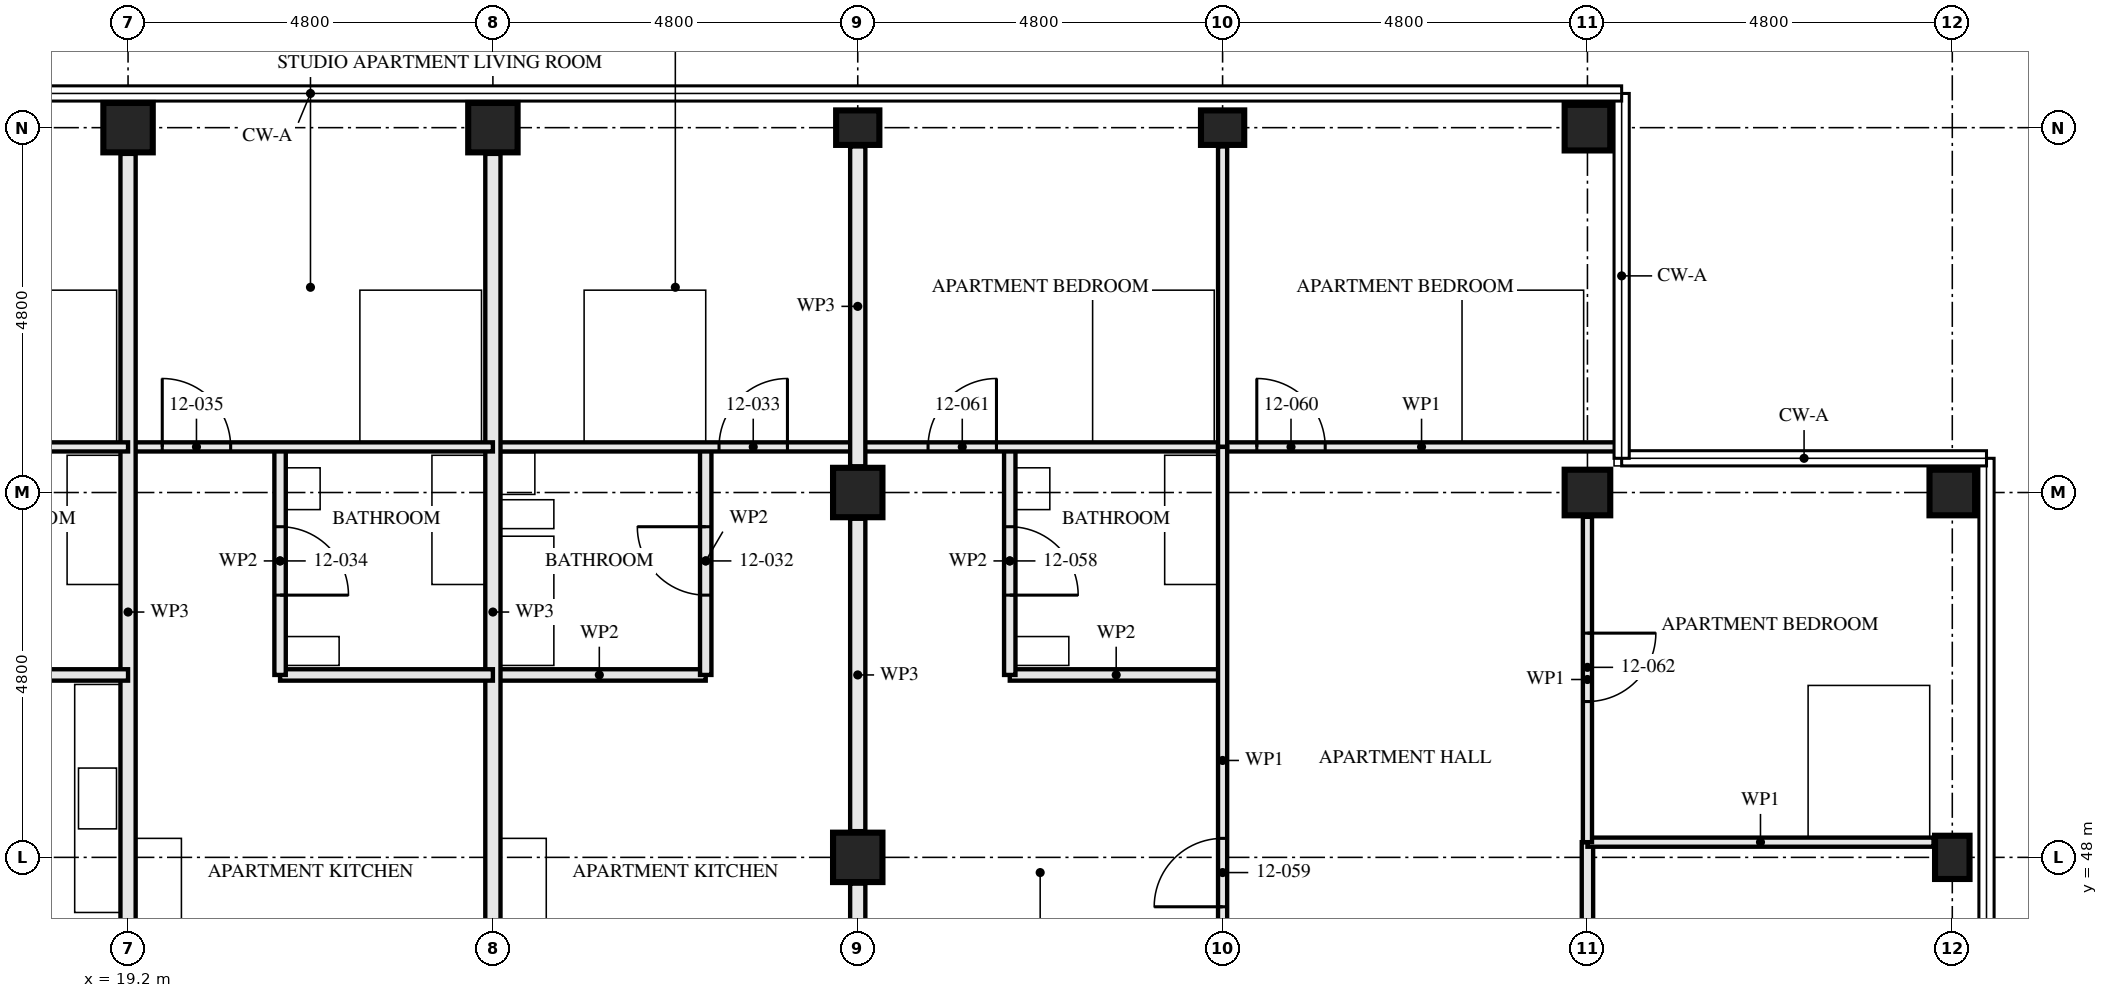
"""IFC4 building model, lengths in metres.
Left out: names, types, materials, properties, quantities, classifications, styles, units other than length and angle.
Written with IfcOpenShell. Run it as: python <this file> out.ifc"""

import sys

from ifc_helpers import new_model, si_unit, direction, frame, frame_2d, origin, origin_2d, place, context, subcontext, project, spatial, rectangle, hollow_rectangle, i_section, extrude, element, fill, save


model = new_model("IFC4")
c1 = context("Model", 3, precision=1e-05, world=origin(), true_north=direction((0.0, 1.0)))
c2 = subcontext(c1, "Body", "Model", "MODEL_VIEW")
j1 = project(units=[si_unit("LENGTHUNIT", "METRE"), si_unit("PLANEANGLEUNIT", "RADIAN")], contexts=[c1])
p1 = place(None, origin())
s1 = spatial("IfcSite", under=j1, at=p1, CompositionType="ELEMENT")
p2 = place(p1, origin())
s2 = spatial("IfcBuilding", under=s1, at=p2, CompositionType="ELEMENT")
p3 = place(p2, frame((0.0, 0.0, 48.0)))
s3 = spatial("IfcBuildingStorey", under=s2, at=p3, CompositionType="ELEMENT", Elevation=48.0)
for number, where, z_axis, x_axis in (
    (1, (19.2, 57.6, 0.0), (0.0, 0.0, 1.0), (0.0, 1.0, 0.0)),
    (2, (24.0, 57.6, 0.0), (0.0, 0.0, 1.0), (0.0, 1.0, 0.0)),
):
    element("IfcColumn", number, at=place(p3, frame(where, z_axis=z_axis, x_axis=x_axis)), inside=s3, PredefinedType="COLUMN", context=c2, shape_type="SweptSolid", body=[
        extrude(hollow_rectangle(XDim=0.65, YDim=0.65, WallThickness=0.08, at=origin_2d()), origin(), (0.0, 0.0, 1.0), 3.5),
    ])
for number, where, z_axis, x_axis in (
    (3, (28.8, 48.0, 0.0), (0.0, 0.0, 1.0), (1.0, 0.0, 0.0)),
    (4, (28.8, 52.8, 0.0), (0.0, 0.0, 1.0), (1.0, 0.0, 0.0)),
):
    element("IfcColumn", number, at=place(p3, frame(where, z_axis=z_axis, x_axis=x_axis)), inside=s3, PredefinedType="COLUMN", context=c2, shape_type="SweptSolid", body=[
        extrude(hollow_rectangle(XDim=0.65, YDim=0.65, WallThickness=0.05, at=origin_2d()), origin(), (0.0, 0.0, 1.0), 3.5),
    ])
for number, where, z_axis, x_axis in (
    (5, (28.8, 57.6, 0.0), (0.0, 0.0, 1.0), (0.0, 1.0, 0.0)),
    (6, (33.6, 57.6, 0.0), (0.0, 0.0, 1.0), (0.0, 1.0, 0.0)),
):
    element("IfcColumn", number, at=place(p3, frame(where, z_axis=z_axis, x_axis=x_axis)), inside=s3, PredefinedType="COLUMN", context=c2, shape_type="SweptSolid", body=[
        extrude(i_section(OverallWidth=0.454, OverallDepth=0.569, WebThickness=0.078, FlangeThickness=0.125, FilletRadius=0.015, at=origin_2d()), origin(), (0.0, 0.0, 1.0), 3.5),
    ])
for number, where, z_axis, x_axis in (
    (7, (38.4, 52.8, 0.0), (0.0, 0.0, 1.0), (0.0, 1.0, 0.0)),
    (8, (38.4, 57.6, 0.0), (0.0, 0.0, 1.0), (0.0, 1.0, 0.0)),
):
    element("IfcColumn", number, at=place(p3, frame(where, z_axis=z_axis, x_axis=x_axis)), inside=s3, PredefinedType="COLUMN", context=c2, shape_type="SweptSolid", body=[
        extrude(hollow_rectangle(XDim=0.6, YDim=0.6, WallThickness=0.05, at=origin_2d()), origin(), (0.0, 0.0, 1.0), 3.5),
    ])
p4 = place(p3, frame((43.2, 48.0, 0.0), z_axis=(0.0, 0.0, 1.0), x_axis=(1.0, 0.0, 0.0)))
e9 = element("IfcColumn", 9, at=p4, inside=s3, PredefinedType="COLUMN", context=c2, shape_type="SweptSolid", body=[
    extrude(i_section(OverallWidth=0.454, OverallDepth=0.569, WebThickness=0.078, FlangeThickness=0.125, FilletRadius=0.015, at=origin_2d()), origin(), (0.0, 0.0, 1.0), 3.5),
])
p5 = place(p3, frame((43.2, 52.8, 0.0), z_axis=(0.0, 0.0, 1.0), x_axis=(0.0, 1.0, 0.0)))
e10 = element("IfcColumn", 10, at=p5, inside=s3, PredefinedType="COLUMN", context=c2, shape_type="SweptSolid", body=[
    extrude(hollow_rectangle(XDim=0.6, YDim=0.6, WallThickness=0.05, at=origin_2d()), origin(), (0.0, 0.0, 1.0), 3.5),
])
p6 = place(p3, frame((26.8, 53.4, 0.0), z_axis=(0.0, 0.0, 1.0), x_axis=(0.0, -1.0, 0.0)))
e11 = element("IfcWall", 11, at=p6, inside=s3, PredefinedType="PARTITIONING", context=c2, shape_type="SweptSolid", body=[
    extrude(rectangle(XDim=3.0, YDim=0.15, at=frame_2d((1.5, 0.0))), origin(), (0.0, 0.0, 1.0), 2.55),
])
p7 = place(p6, frame((1.05, 0.0, 0.0)))
e12 = element("IfcOpeningElement", 12, at=p7, cuts=e11, PredefinedType="OPENING", context=c2, shape_type="SweptSolid", body=[
    extrude(rectangle(XDim=0.9, YDim=2.1, at=frame_2d((0.45, 1.05))), frame((0.0, 0.085, 0.0), z_axis=(0.0, -1.0, 0.0), x_axis=(1.0, 0.0, 0.0)), (0.0, 0.0, 1.0), 0.171),
])
p8 = place(p3, frame((26.8, 50.4, 0.0), z_axis=(0.0, 0.0, 1.0), x_axis=(-1.0, 0.0, 0.0)))
e13 = element("IfcWall", 13, at=p8, inside=s3, PredefinedType="PARTITIONING", context=c2, shape_type="SweptSolid", body=[
    extrude(rectangle(XDim=2.8, YDim=0.15, at=frame_2d((1.4, 0.0))), origin(), (0.0, 0.0, 1.0), 3.33),
])
p9 = place(p3, frame((28.8, 53.4, 0.0), z_axis=(0.0, 0.0, 1.0), x_axis=(-1.0, 0.0, 0.0)))
e14 = element("IfcWall", 14, at=p9, inside=s3, PredefinedType="PARTITIONING", context=c2, shape_type="SweptSolid", body=[
    extrude(rectangle(XDim=4.8, YDim=0.12, at=frame_2d((2.4, 0.0))), origin(), (0.0, 0.0, 1.0), 3.33),
])
p10 = place(p9, frame((0.925, 0.0, 0.0)))
e15 = element("IfcOpeningElement", 15, at=p10, cuts=e14, PredefinedType="OPENING", context=c2, shape_type="SweptSolid", body=[
    extrude(rectangle(XDim=0.9, YDim=2.1, at=frame_2d((0.45, 1.05))), frame((0.0, 0.071, 0.0), z_axis=(0.0, -1.0, 0.0), x_axis=(1.0, 0.0, 0.0)), (0.0, 0.0, 1.0), 0.141),
])
p11 = place(p3, frame((24.0, 57.255, 0.0), z_axis=(0.0, 0.0, 1.0), x_axis=(0.0, -1.0, 0.0)))
e16 = element("IfcWall", 16, at=p11, inside=s3, PredefinedType="PARTITIONING", context=c2, shape_type="SweptSolid", body=[
    extrude(rectangle(XDim=12.055, YDim=0.2, at=frame_2d((6.027, 0.0))), origin(), (0.0, 0.0, 1.0), 2.55),
])
p12 = place(p3, frame((21.2, 53.4, 0.0), z_axis=(0.0, 0.0, 1.0), x_axis=(0.0, -1.0, 0.0)))
e17 = element("IfcWall", 17, at=p12, inside=s3, PredefinedType="PARTITIONING", context=c2, shape_type="SweptSolid", body=[
    extrude(rectangle(XDim=3.0, YDim=0.15, at=frame_2d((1.5, 0.0))), origin(), (0.0, 0.0, 1.0), 2.55),
])
p13 = place(p12, frame((1.05, 0.0, 0.0)))
e18 = element("IfcOpeningElement", 18, at=p13, cuts=e17, PredefinedType="OPENING", context=c2, shape_type="SweptSolid", body=[
    extrude(rectangle(XDim=0.9, YDim=2.1, at=frame_2d((0.45, 1.05))), frame((0.0, 0.085, 0.0), z_axis=(0.0, -1.0, 0.0), x_axis=(1.0, 0.0, 0.0)), (0.0, 0.0, 1.0), 0.171),
])
p14 = place(p3, frame((24.0, 50.4, 0.0), z_axis=(0.0, 0.0, 1.0), x_axis=(-1.0, 0.0, 0.0)))
e19 = element("IfcWall", 19, at=p14, inside=s3, PredefinedType="PARTITIONING", context=c2, shape_type="SweptSolid", body=[
    extrude(rectangle(XDim=2.8, YDim=0.15, at=frame_2d((1.4, 0.0))), origin(), (0.0, 0.0, 1.0), 3.33),
])
p15 = place(p3, frame((24.0, 53.4, 0.0), z_axis=(0.0, 0.0, 1.0), x_axis=(-1.0, 0.0, 0.0)))
e20 = element("IfcWall", 20, at=p15, inside=s3, PredefinedType="PARTITIONING", context=c2, shape_type="SweptSolid", body=[
    extrude(rectangle(XDim=4.8, YDim=0.12, at=frame_2d((2.4, 0.0))), origin(), (0.0, 0.0, 1.0), 3.33),
])
p16 = place(p15, frame((3.45, 0.0, 0.0)))
e21 = element("IfcOpeningElement", 21, at=p16, cuts=e20, PredefinedType="OPENING", context=c2, shape_type="SweptSolid", body=[
    extrude(rectangle(XDim=0.9, YDim=2.1, at=frame_2d((0.45, 1.05))), frame((0.0, 0.071, 0.0), z_axis=(0.0, -1.0, 0.0), x_axis=(1.0, 0.0, 0.0)), (0.0, 0.0, 1.0), 0.141),
])
p17 = place(p3, frame((19.2, 57.255, 0.0), z_axis=(0.0, 0.0, 1.0), x_axis=(0.0, -1.0, 0.0)))
e22 = element("IfcWall", 22, at=p17, inside=s3, PredefinedType="PARTITIONING", context=c2, shape_type="SweptSolid", body=[
    extrude(rectangle(XDim=12.055, YDim=0.2, at=frame_2d((6.027, 0.0))), origin(), (0.0, 0.0, 1.0), 2.55),
])
p18 = place(p3, frame((19.2, 50.4, 0.0), z_axis=(0.0, 0.0, 1.0), x_axis=(-1.0, 0.0, 0.0)))
e23 = element("IfcWall", 23, at=p18, inside=s3, PredefinedType="PARTITIONING", context=c2, shape_type="SweptSolid", body=[
    extrude(rectangle(XDim=2.8, YDim=0.15, at=frame_2d((1.4, 0.0))), origin(), (0.0, 0.0, 1.0), 3.33),
])
p19 = place(p3, frame((19.2, 53.4, 0.0), z_axis=(0.0, 0.0, 1.0), x_axis=(-1.0, 0.0, 0.0)))
e24 = element("IfcWall", 24, at=p19, inside=s3, PredefinedType="PARTITIONING", context=c2, shape_type="SweptSolid", body=[
    extrude(rectangle(XDim=4.8, YDim=0.12, at=frame_2d((2.4, 0.0))), origin(), (0.0, 0.0, 1.0), 3.33),
])
p20 = place(p19, frame((2.975, 0.0, 0.0)))
e25 = element("IfcOpeningElement", 25, at=p20, cuts=e24, PredefinedType="OPENING", context=c2, shape_type="SweptSolid", body=[
    extrude(rectangle(XDim=0.9, YDim=2.1, at=frame_2d((0.45, 1.05))), frame((0.0, 0.071, 0.0), z_axis=(0.0, -1.0, 0.0), x_axis=(1.0, 0.0, 0.0)), (0.0, 0.0, 1.0), 0.141),
])
p21 = place(p3, frame((38.4, 48.2, 0.0), z_axis=(0.0, 0.0, 1.0), x_axis=(0.0, -1.0, 0.0)))
e26 = element("IfcWall", 26, at=p21, inside=s3, PredefinedType="PARTITIONING", context=c2, shape_type="SweptSolid", body=[
    extrude(rectangle(XDim=3.0, YDim=0.15, at=frame_2d((1.5, 0.0))), origin(), (0.0, 0.0, 1.0), 2.55),
])
p22 = place(p21, frame((1.05, 0.0, 0.0)))
e27 = element("IfcOpeningElement", 27, at=p22, cuts=e26, PredefinedType="OPENING", context=c2, shape_type="SweptSolid", body=[
    extrude(rectangle(XDim=0.9, YDim=2.1, at=frame_2d((0.45, 1.05))), frame((0.0, 0.085, 0.0), z_axis=(0.0, -1.0, 0.0), x_axis=(1.0, 0.0, 0.0)), (0.0, 0.0, 1.0), 0.171),
])
p23 = place(p3, frame((30.8, 53.4, 0.0), z_axis=(0.0, 0.0, 1.0), x_axis=(0.0, -1.0, 0.0)))
e28 = element("IfcWall", 28, at=p23, inside=s3, PredefinedType="PARTITIONING", context=c2, shape_type="SweptSolid", body=[
    extrude(rectangle(XDim=3.0, YDim=0.15, at=frame_2d((1.5, 0.0))), origin(), (0.0, 0.0, 1.0), 2.55),
])
p24 = place(p23, frame((1.05, 0.0, 0.0)))
e29 = element("IfcOpeningElement", 29, at=p24, cuts=e28, PredefinedType="OPENING", context=c2, shape_type="SweptSolid", body=[
    extrude(rectangle(XDim=0.9, YDim=2.1, at=frame_2d((0.45, 1.05))), frame((0.0, 0.085, 0.0), z_axis=(0.0, -1.0, 0.0), x_axis=(1.0, 0.0, 0.0)), (0.0, 0.0, 1.0), 0.171),
])
p25 = place(p3, frame((33.6, 50.4, 0.0), z_axis=(0.0, 0.0, 1.0), x_axis=(-1.0, 0.0, 0.0)))
e30 = element("IfcWall", 30, at=p25, inside=s3, PredefinedType="PARTITIONING", context=c2, shape_type="SweptSolid", body=[
    extrude(rectangle(XDim=2.8, YDim=0.15, at=frame_2d((1.4, 0.0))), origin(), (0.0, 0.0, 1.0), 3.33),
])
p26 = place(p3, frame((33.6, 53.4, 0.0), z_axis=(0.0, 0.0, 1.0), x_axis=(0.0, -1.0, 0.0)))
e31 = element("IfcWall", 31, at=p26, inside=s3, PredefinedType="PARTITIONING", context=c2, shape_type="SweptSolid", body=[
    extrude(rectangle(XDim=8.25, YDim=0.12, at=frame_2d((4.125, 0.0))), origin(), (0.0, 0.0, 1.0), 2.55),
])
p27 = place(p26, frame((5.15, 0.0, 0.0)))
e32 = element("IfcOpeningElement", 32, at=p27, cuts=e31, PredefinedType="OPENING", context=c2, shape_type="SweptSolid", body=[
    extrude(rectangle(XDim=0.9, YDim=2.1, at=frame_2d((0.45, 1.05))), frame((0.0, 0.071, 0.0), z_axis=(0.0, -1.0, 0.0), x_axis=(1.0, 0.0, 0.0)), (0.0, 0.0, 1.0), 0.141),
])
p28 = place(p3, frame((42.953, 48.2, 0.0), z_axis=(0.0, 0.0, 1.0), x_axis=(-1.0, 0.0, 0.0)))
e33 = element("IfcWall", 33, at=p28, inside=s3, PredefinedType="PARTITIONING", context=c2, shape_type="SweptSolid", body=[
    extrude(rectangle(XDim=4.553, YDim=0.12, at=frame_2d((2.276, 0.0))), origin(), (0.0, 0.0, 1.0), 3.33),
])
p29 = place(p3, frame((38.835, 53.4, 0.0), z_axis=(0.0, 0.0, 1.0), x_axis=(-1.0, 0.0, 0.0)))
e34 = element("IfcWall", 34, at=p29, inside=s3, PredefinedType="PARTITIONING", context=c2, shape_type="SweptSolid", body=[
    extrude(rectangle(XDim=5.235, YDim=0.12, at=frame_2d((2.617, 0.0))), origin(), (0.0, 0.0, 1.0), 2.32),
])
p30 = place(p29, frame((3.885, 0.0, 0.0)))
e35 = element("IfcOpeningElement", 35, at=p30, cuts=e34, PredefinedType="OPENING", context=c2, shape_type="SweptSolid", body=[
    extrude(rectangle(XDim=0.9, YDim=2.1, at=frame_2d((0.45, 1.05))), frame((0.0, 0.071, 0.0), z_axis=(0.0, -1.0, 0.0), x_axis=(1.0, 0.0, 0.0)), (0.0, 0.0, 1.0), 0.141),
])
p31 = place(p3, frame((33.6, 53.4, 0.0), z_axis=(0.0, 0.0, 1.0), x_axis=(-1.0, 0.0, 0.0)))
e36 = element("IfcWall", 36, at=p31, inside=s3, PredefinedType="PARTITIONING", context=c2, shape_type="SweptSolid", body=[
    extrude(rectangle(XDim=4.8, YDim=0.12, at=frame_2d((2.4, 0.0))), origin(), (0.0, 0.0, 1.0), 3.33),
])
p32 = place(p31, frame((2.975, 0.0, 0.0)))
e37 = element("IfcOpeningElement", 37, at=p32, cuts=e36, PredefinedType="OPENING", context=c2, shape_type="SweptSolid", body=[
    extrude(rectangle(XDim=0.9, YDim=2.1, at=frame_2d((0.45, 1.05))), frame((0.0, 0.071, 0.0), z_axis=(0.0, -1.0, 0.0), x_axis=(1.0, 0.0, 0.0)), (0.0, 0.0, 1.0), 0.141),
])
p33 = place(p3, frame((38.4, 52.48, 0.0), z_axis=(0.0, 0.0, 1.0), x_axis=(0.0, -1.0, 0.0)))
e38 = element("IfcWall", 38, at=p33, inside=s3, PredefinedType="PARTITIONING", context=c2, shape_type="SweptSolid", body=[
    extrude(rectangle(XDim=4.28, YDim=0.12, at=frame_2d((2.14, 0.0))), origin(), (0.0, 0.0, 1.0), 3.33),
])
p34 = place(p33, frame((1.53, 0.0, 0.0)))
e39 = element("IfcOpeningElement", 39, at=p34, cuts=e38, PredefinedType="OPENING", context=c2, shape_type="SweptSolid", body=[
    extrude(rectangle(XDim=0.9, YDim=2.1, at=frame_2d((0.45, 1.05))), frame((0.0, 0.071, 0.0), z_axis=(0.0, -1.0, 0.0), x_axis=(1.0, 0.0, 0.0)), (0.0, 0.0, 1.0), 0.141),
])
p35 = place(p3, frame((33.6, 57.353, 0.0), z_axis=(0.0, 0.0, 1.0), x_axis=(0.0, -1.0, 0.0)))
e40 = element("IfcWall", 40, at=p35, inside=s3, PredefinedType="PARTITIONING", context=c2, shape_type="SweptSolid", body=[
    extrude(rectangle(XDim=3.953, YDim=0.12, at=frame_2d((1.977, 0.0))), origin(), (0.0, 0.0, 1.0), 3.33),
])
p36 = place(p3, frame((28.8, 45.1, 0.0), z_axis=(0.0, 0.0, 1.0), x_axis=(0.0, 1.0, 0.0)))
e41 = element("IfcWall", 41, at=p36, inside=s3, PredefinedType="PARTITIONING", context=c2, shape_type="SweptSolid", body=[
    extrude(rectangle(XDim=2.555, YDim=0.2, at=frame_2d((1.277, 0.0))), origin(), (0.0, 0.0, 1.0), 2.32),
])
p37 = place(p3, frame((28.8, 48.345, 0.0), z_axis=(0.0, 0.0, 1.0), x_axis=(0.0, 1.0, 0.0)))
e42 = element("IfcWall", 42, at=p37, inside=s3, PredefinedType="PARTITIONING", context=c2, shape_type="SweptSolid", body=[
    extrude(rectangle(XDim=4.11, YDim=0.2, at=frame_2d((2.055, 0.0))), origin(), (0.0, 0.0, 1.0), 2.32),
])
p38 = place(p3, frame((28.8, 53.145, 0.0), z_axis=(0.0, 0.0, 1.0), x_axis=(0.0, 1.0, 0.0)))
e43 = element("IfcWall", 43, at=p38, inside=s3, PredefinedType="PARTITIONING", context=c2, shape_type="SweptSolid", body=[
    extrude(rectangle(XDim=4.208, YDim=0.2, at=frame_2d((2.104, 0.0))), origin(), (0.0, 0.0, 1.0), 2.32),
])
p39 = place(p7, frame((0.9, 0.0, 0.0), z_axis=(0.0, 0.0, 1.0), x_axis=(-1.0, 0.0, 0.0)))
e44 = element("IfcDoor", 44, at=p39, inside=s3, OperationType="SINGLE_SWING_LEFT", PredefinedType="DOOR", context=c2, shape_type="SweptSolid", body=[
    extrude(rectangle(XDim=0.9, YDim=2.1, at=frame_2d((0.45, 1.05))), frame((0.0, 0.022, 0.0), z_axis=(0.0, -1.0, 0.0), x_axis=(1.0, 0.0, 0.0)), (0.0, 0.0, 1.0), 0.044),
])
fill(e12, e44)
p40 = place(p10, frame((0.9, 0.0, 0.0), z_axis=(0.0, 0.0, 1.0), x_axis=(-1.0, 0.0, 0.0)))
e45 = element("IfcDoor", 45, at=p40, inside=s3, OperationType="SINGLE_SWING_LEFT", PredefinedType="DOOR", context=c2, shape_type="SweptSolid", body=[
    extrude(rectangle(XDim=0.9, YDim=2.1, at=frame_2d((0.45, 1.05))), frame((0.0, 0.022, 0.0), z_axis=(0.0, -1.0, 0.0), x_axis=(1.0, 0.0, 0.0)), (0.0, 0.0, 1.0), 0.044),
])
fill(e15, e45)
p41 = place(p13, origin())
e46 = element("IfcDoor", 46, at=p41, inside=s3, OperationType="SINGLE_SWING_LEFT", PredefinedType="DOOR", context=c2, shape_type="SweptSolid", body=[
    extrude(rectangle(XDim=0.9, YDim=2.1, at=frame_2d((0.45, 1.05))), frame((0.0, 0.022, 0.0), z_axis=(0.0, -1.0, 0.0), x_axis=(1.0, 0.0, 0.0)), (0.0, 0.0, 1.0), 0.044),
])
fill(e18, e46)
p42 = place(p16, frame((0.9, 0.0, 0.0), z_axis=(0.0, 0.0, 1.0), x_axis=(-1.0, 0.0, 0.0)))
e47 = element("IfcDoor", 47, at=p42, inside=s3, OperationType="SINGLE_SWING_RIGHT", PredefinedType="DOOR", context=c2, shape_type="SweptSolid", body=[
    extrude(rectangle(XDim=0.9, YDim=2.1, at=frame_2d((0.45, 1.05))), frame((0.0, 0.022, 0.0), z_axis=(0.0, -1.0, 0.0), x_axis=(1.0, 0.0, 0.0)), (0.0, 0.0, 1.0), 0.044),
])
fill(e21, e47)
p43 = place(p24, origin())
e48 = element("IfcDoor", 48, at=p43, inside=s3, OperationType="SINGLE_SWING_LEFT", PredefinedType="DOOR", context=c2, shape_type="SweptSolid", body=[
    extrude(rectangle(XDim=0.9, YDim=2.1, at=frame_2d((0.45, 1.05))), frame((0.0, 0.022, 0.0), z_axis=(0.0, -1.0, 0.0), x_axis=(1.0, 0.0, 0.0)), (0.0, 0.0, 1.0), 0.044),
])
fill(e29, e48)
p44 = place(p27, frame((0.9, 0.0, 0.0), z_axis=(0.0, 0.0, 1.0), x_axis=(-1.0, 0.0, 0.0)))
e49 = element("IfcDoor", 49, at=p44, inside=s3, OperationType="SINGLE_SWING_RIGHT", PredefinedType="DOOR", context=c2, shape_type="SweptSolid", body=[
    extrude(rectangle(XDim=0.9, YDim=2.1, at=frame_2d((0.45, 1.05))), frame((0.0, 0.022, 0.0), z_axis=(0.0, -1.0, 0.0), x_axis=(1.0, 0.0, 0.0)), (0.0, 0.0, 1.0), 0.044),
])
fill(e32, e49)
p45 = place(p30, frame((0.9, 0.0, 0.0), z_axis=(0.0, 0.0, 1.0), x_axis=(-1.0, 0.0, 0.0)))
e50 = element("IfcDoor", 50, at=p45, inside=s3, OperationType="SINGLE_SWING_RIGHT", PredefinedType="DOOR", context=c2, shape_type="SweptSolid", body=[
    extrude(rectangle(XDim=0.9, YDim=2.1, at=frame_2d((0.45, 1.05))), frame((0.0, 0.022, 0.0), z_axis=(0.0, -1.0, 0.0), x_axis=(1.0, 0.0, 0.0)), (0.0, 0.0, 1.0), 0.044),
])
fill(e35, e50)
p46 = place(p32, frame((0.9, 0.0, 0.0), z_axis=(0.0, 0.0, 1.0), x_axis=(-1.0, 0.0, 0.0)))
e51 = element("IfcDoor", 51, at=p46, inside=s3, OperationType="SINGLE_SWING_LEFT", PredefinedType="DOOR", context=c2, shape_type="SweptSolid", body=[
    extrude(rectangle(XDim=0.9, YDim=2.1, at=frame_2d((0.45, 1.05))), frame((0.0, 0.022, 0.0), z_axis=(0.0, -1.0, 0.0), x_axis=(1.0, 0.0, 0.0)), (0.0, 0.0, 1.0), 0.044),
])
fill(e37, e51)
p47 = place(p34, origin())
e52 = element("IfcDoor", 52, at=p47, inside=s3, OperationType="SINGLE_SWING_RIGHT", PredefinedType="DOOR", context=c2, shape_type="SweptSolid", body=[
    extrude(rectangle(XDim=0.9, YDim=2.1, at=frame_2d((0.45, 1.05))), frame((0.0, 0.022, 0.0), z_axis=(0.0, -1.0, 0.0), x_axis=(1.0, 0.0, 0.0)), (0.0, 0.0, 1.0), 0.044),
])
fill(e39, e52)
save(model, sys.argv[1])
